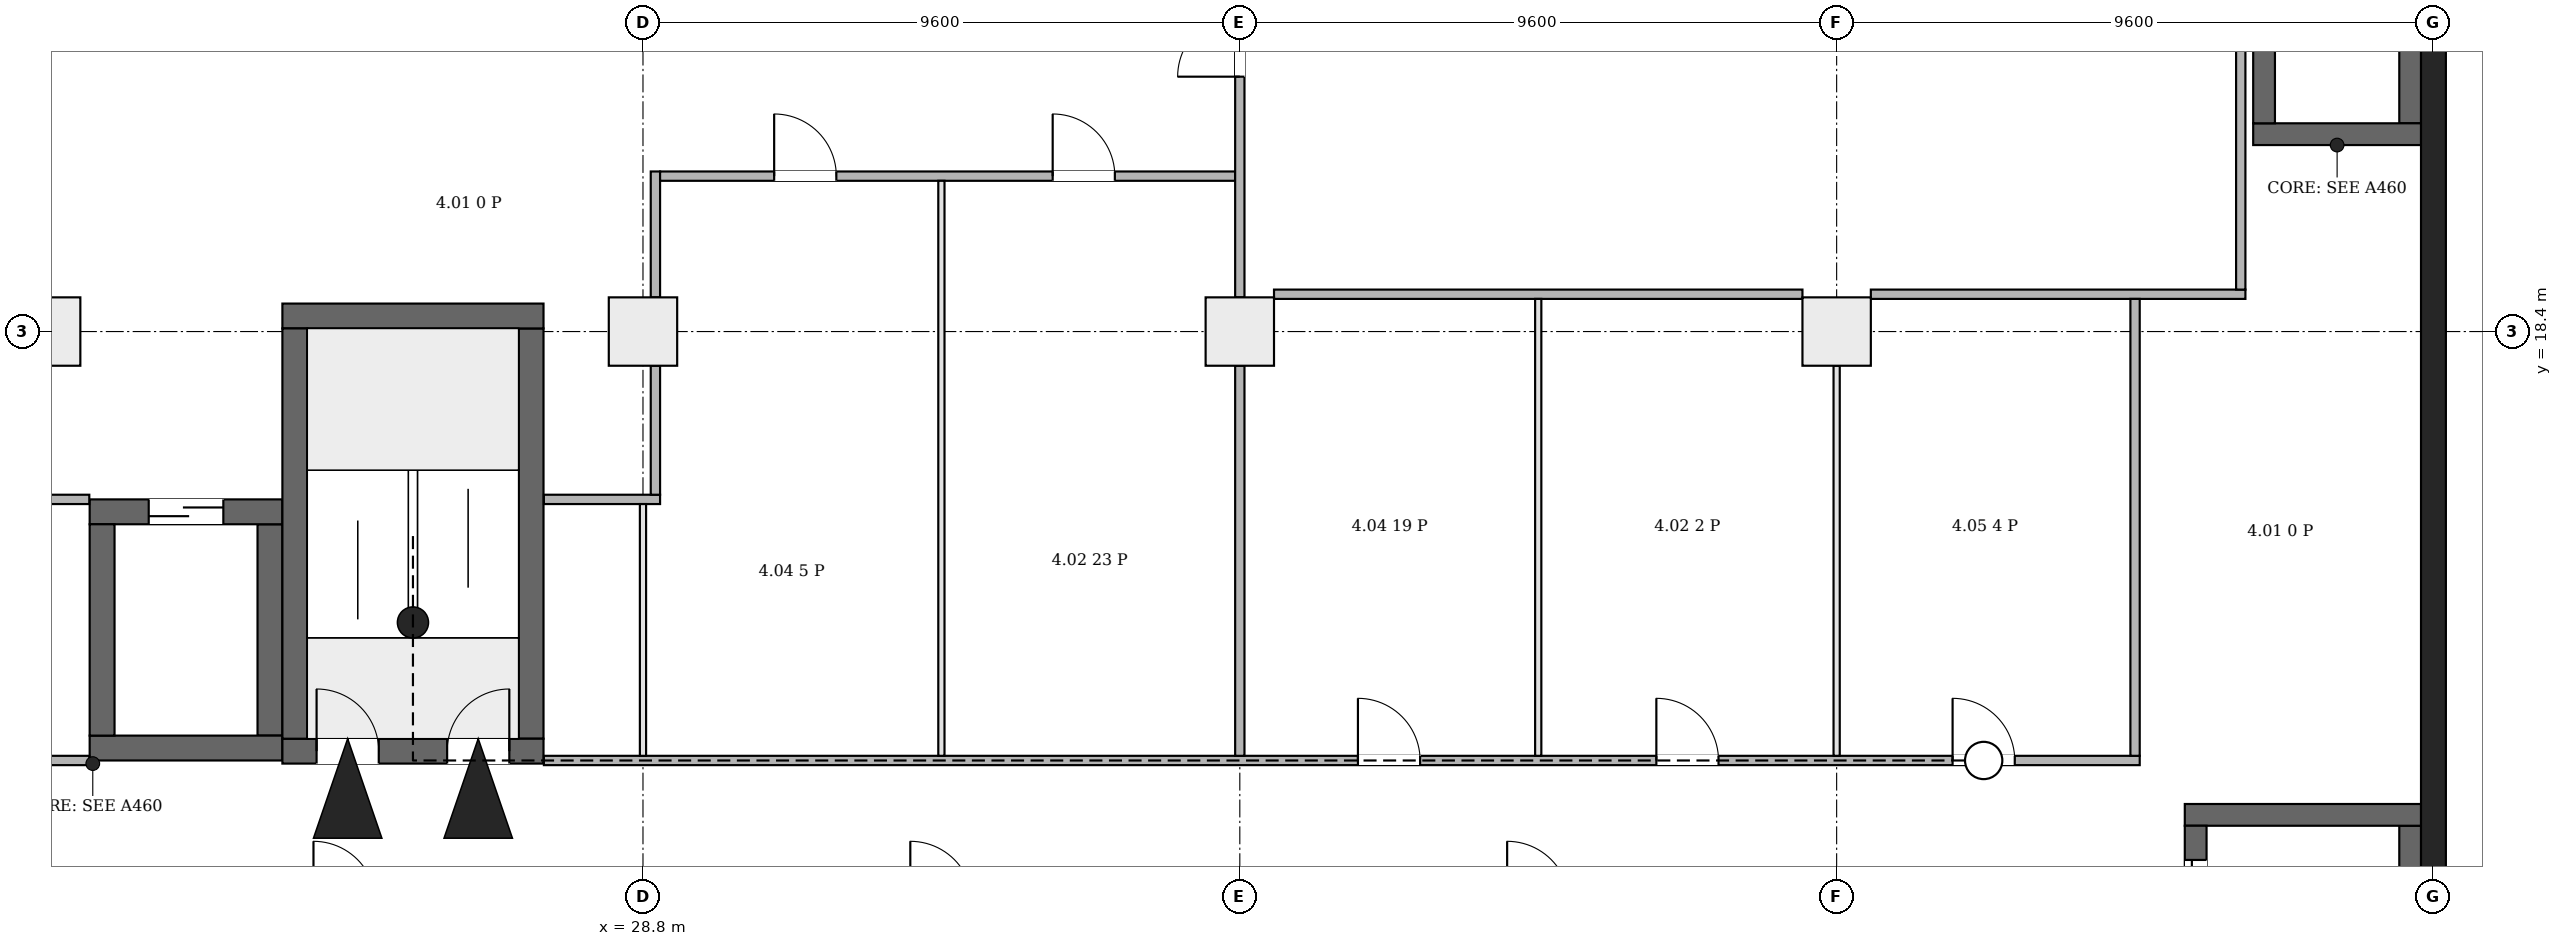
"""IFC4 building model, lengths in metres.
Left out: names, types, materials, properties, quantities, classifications, styles, units other than length and angle.
Written with IfcOpenShell. Run it as: python <this file> out.ifc"""

import sys

from ifc_helpers import new_model, si_unit, direction, frame, frame_2d, origin, origin_2d, place, context, subcontext, project, spatial, rectangle, extrude, element, fill, save


model = new_model("IFC4")
c1 = context("Model", 3, precision=1e-05, world=origin(), true_north=direction((0.0, 1.0)))
c2 = subcontext(c1, "Body", "Model", "MODEL_VIEW")
j1 = project(units=[si_unit("LENGTHUNIT", "METRE"), si_unit("PLANEANGLEUNIT", "RADIAN")], contexts=[c1])
p1 = place(None, origin())
s1 = spatial("IfcSite", under=j1, at=p1, CompositionType="ELEMENT")
p2 = place(p1, origin())
s2 = spatial("IfcBuilding", under=s1, at=p2, CompositionType="ELEMENT")
p3 = place(p2, frame((0.0, 0.0, 26.7)))
s3 = spatial("IfcBuildingStorey", under=s2, at=p3, CompositionType="ELEMENT", Elevation=26.7)
p4 = place(p3, frame((57.6, -0.2, 0.0), z_axis=(0.0, 0.0, 1.0), x_axis=(0.0, 1.0, 0.0)))
e1 = element("IfcWall", 1, at=p4, inside=s3, PredefinedType="SHEAR", context=c2, shape_type="SweptSolid", body=[
    extrude(rectangle(XDim=46.88, YDim=0.4, at=frame_2d((23.44, 0.0))), origin(), (0.0, 0.0, 1.0), 5.2),
])
p5 = place(p3, frame((23.0, 11.65, 0.0), z_axis=(0.0, 0.0, 1.0), x_axis=(1.0, 0.0, 0.0)))
e2 = element("IfcWall", 2, at=p5, inside=s3, PredefinedType="SHEAR", context=c2, shape_type="SweptSolid", body=[
    extrude(rectangle(XDim=4.2, YDim=0.4, at=frame_2d((2.1, 0.0))), origin(), (0.0, 0.0, 1.0), 5.2),
])
p6 = place(p5, frame((0.55, 0.0, 0.0)))
e3 = element("IfcOpeningElement", 3, at=p6, cuts=e2, PredefinedType="OPENING", context=c2, shape_type="SweptSolid", body=[
    extrude(rectangle(XDim=1.0, YDim=2.1, at=frame_2d((0.5, 1.05))), frame((0.0, 0.21, 0.0), z_axis=(0.0, -1.0, 0.0), x_axis=(1.0, 0.0, 0.0)), (0.0, 0.0, 1.0), 0.42),
])
p7 = place(p5, frame((2.65, 0.0, 0.0)))
e4 = element("IfcOpeningElement", 4, at=p7, cuts=e2, PredefinedType="OPENING", context=c2, shape_type="SweptSolid", body=[
    extrude(rectangle(XDim=1.0, YDim=2.1, at=frame_2d((0.5, 1.05))), frame((0.0, 0.21, 0.0), z_axis=(0.0, -1.0, 0.0), x_axis=(1.0, 0.0, 0.0)), (0.0, 0.0, 1.0), 0.42),
])
p8 = place(p3, frame((23.0, 18.65, 0.0), z_axis=(0.0, 0.0, 1.0), x_axis=(1.0, 0.0, 0.0)))
e5 = element("IfcWall", 5, at=p8, inside=s3, PredefinedType="SHEAR", context=c2, shape_type="SweptSolid", body=[
    extrude(rectangle(XDim=4.2, YDim=0.4, at=frame_2d((2.1, 0.0))), origin(), (0.0, 0.0, 1.0), 5.2),
])
for number, where, z_axis, x_axis in (
    (6, (23.2, 11.85, 0.0), (0.0, 0.0, 1.0), (0.0, 1.0, 0.0)),
    (7, (27.0, 11.85, 0.0), (0.0, 0.0, 1.0), (0.0, 1.0, 0.0)),
):
    element("IfcWall", number, at=place(p3, frame(where, z_axis=z_axis, x_axis=x_axis)), inside=s3, PredefinedType="SHEAR", context=c2, shape_type="SweptSolid", body=[
        extrude(rectangle(XDim=6.6, YDim=0.4, at=frame_2d((3.3, 0.0))), origin(), (0.0, 0.0, 1.0), 5.2),
    ])
p9 = place(p3, frame((53.6, 10.625, 0.0), z_axis=(0.0, 0.0, 1.0), x_axis=(1.0, 0.0, 0.0)))
e8 = element("IfcWall", 8, at=p9, inside=s3, PredefinedType="SHEAR", context=c2, shape_type="SweptSolid", body=[
    extrude(rectangle(XDim=3.8, YDim=0.35, at=frame_2d((1.9, 0.0))), origin(), (0.0, 0.0, 1.0), 5.2),
])
p10 = place(p3, frame((53.775, 8.25, 0.0), z_axis=(0.0, 0.0, 1.0), x_axis=(0.0, 1.0, 0.0)))
e9 = element("IfcWall", 9, at=p10, inside=s3, PredefinedType="SHEAR", context=c2, shape_type="SweptSolid", body=[
    extrude(rectangle(XDim=2.2, YDim=0.35, at=frame_2d((1.1, 0.0))), origin(), (0.0, 0.0, 1.0), 5.2),
])
p11 = place(p10, frame((0.55, 0.0, 0.0)))
e10 = element("IfcOpeningElement", 10, at=p11, cuts=e9, PredefinedType="OPENING", context=c2, shape_type="SweptSolid", body=[
    extrude(rectangle(XDim=1.1, YDim=2.1, at=frame_2d((0.55, 1.05))), frame((0.0, 0.185, 0.0), z_axis=(0.0, -1.0, 0.0), x_axis=(1.0, 0.0, 0.0)), (0.0, 0.0, 1.0), 0.37),
])
p12 = place(p3, frame((57.225, 8.25, 0.0), z_axis=(0.0, 0.0, 1.0), x_axis=(0.0, 1.0, 0.0)))
e11 = element("IfcWall", 11, at=p12, inside=s3, PredefinedType="SHEAR", context=c2, shape_type="SweptSolid", body=[
    extrude(rectangle(XDim=2.2, YDim=0.35, at=frame_2d((1.1, 0.0))), origin(), (0.0, 0.0, 1.0), 5.2),
])
p13 = place(p3, frame((54.7, 21.575, 0.0), z_axis=(0.0, 0.0, 1.0), x_axis=(1.0, 0.0, 0.0)))
e12 = element("IfcWall", 12, at=p13, inside=s3, PredefinedType="SHEAR", context=c2, shape_type="SweptSolid", body=[
    extrude(rectangle(XDim=2.7, YDim=0.35, at=frame_2d((1.35, 0.0))), origin(), (0.0, 0.0, 1.0), 5.2),
])
for number, where, z_axis, x_axis in (
    (13, (54.875, 21.75, 0.0), (0.0, 0.0, 1.0), (0.0, 1.0, 0.0)),
    (14, (57.225, 21.75, 0.0), (0.0, 0.0, 1.0), (0.0, 1.0, 0.0)),
):
    element("IfcWall", number, at=place(p3, frame(where, z_axis=z_axis, x_axis=x_axis)), inside=s3, PredefinedType="SHEAR", context=c2, shape_type="SweptSolid", body=[
        extrude(rectangle(XDim=3.5, YDim=0.35, at=frame_2d((1.75, 0.0))), origin(), (0.0, 0.0, 1.0), 5.2),
    ])
p14 = place(p3, frame((19.9, 11.7, 0.0), z_axis=(0.0, 0.0, 1.0), x_axis=(1.0, 0.0, 0.0)))
e15 = element("IfcWall", 15, at=p14, inside=s3, PredefinedType="SHEAR", context=c2, shape_type="SweptSolid", body=[
    extrude(rectangle(XDim=3.1, YDim=0.4, at=frame_2d((1.55, 0.0))), origin(), (0.0, 0.0, 1.0), 5.2),
])
p15 = place(p3, frame((19.9, 15.5, 0.0), z_axis=(0.0, 0.0, 1.0), x_axis=(1.0, 0.0, 0.0)))
e16 = element("IfcWall", 16, at=p15, inside=s3, PredefinedType="SHEAR", context=c2, shape_type="SweptSolid", body=[
    extrude(rectangle(XDim=3.1, YDim=0.4, at=frame_2d((1.55, 0.0))), origin(), (0.0, 0.0, 1.0), 5.2),
])
p16 = place(p15, frame((0.95, 0.0, 0.0)))
e17 = element("IfcOpeningElement", 17, at=p16, cuts=e16, PredefinedType="OPENING", context=c2, shape_type="SweptSolid", body=[
    extrude(rectangle(XDim=1.2, YDim=2.1, at=frame_2d((0.6, 1.05))), frame((0.0, 0.21, 0.0), z_axis=(0.0, -1.0, 0.0), x_axis=(1.0, 0.0, 0.0)), (0.0, 0.0, 1.0), 0.42),
])
for number, where, z_axis, x_axis in (
    (18, (20.1, 11.9, 0.0), (0.0, 0.0, 1.0), (0.0, 1.0, 0.0)),
    (19, (22.8, 11.9, 0.0), (0.0, 0.0, 1.0), (0.0, 1.0, 0.0)),
):
    element("IfcWall", number, at=place(p3, frame(where, z_axis=z_axis, x_axis=x_axis)), inside=s3, PredefinedType="SHEAR", context=c2, shape_type="SweptSolid", body=[
        extrude(rectangle(XDim=3.4, YDim=0.4, at=frame_2d((1.7, 0.0))), origin(), (0.0, 0.0, 1.0), 5.2),
    ])
for number, where, z_axis, x_axis in (
    (20, (19.2, 18.4, 0.0), (0.0, 0.0, 1.0), (1.0, 0.0, 0.0)),
    (21, (28.8, 18.4, 0.0), (0.0, 0.0, 1.0), (1.0, 0.0, 0.0)),
    (22, (38.4, 18.4, 0.0), (0.0, 0.0, 1.0), (1.0, 0.0, 0.0)),
    (23, (48.0, 18.4, 0.0), (0.0, 0.0, 1.0), (1.0, 0.0, 0.0)),
):
    element("IfcColumn", number, at=place(p3, frame(where, z_axis=z_axis, x_axis=x_axis)), inside=s3, PredefinedType="COLUMN", context=c2, shape_type="SweptSolid", body=[
        extrude(rectangle(XDim=1.1, YDim=1.1, at=origin_2d()), origin(), (0.0, 0.0, 1.0), 5.2),
    ])
p17 = place(p3, frame((10.325, 11.5, 0.0), z_axis=(0.0, 0.0, 1.0), x_axis=(1.0, 0.0, 0.0)))
e24 = element("IfcWall", 24, at=p17, inside=s3, PredefinedType="PARTITIONING", context=c2, shape_type="SweptSolid", body=[
    extrude(rectangle(XDim=9.569, YDim=0.15, at=frame_2d((4.785, 0.0))), origin(), (0.0, 0.0, 1.0), 4.85),
])
p18 = place(p3, frame((16.206, 15.7, 0.0), z_axis=(0.0, 0.0, 1.0), x_axis=(1.0, 0.0, 0.0)))
e25 = element("IfcWall", 25, at=p18, inside=s3, PredefinedType="PARTITIONING", context=c2, shape_type="SweptSolid", body=[
    extrude(rectangle(XDim=3.688, YDim=0.15, at=frame_2d((1.844, 0.0))), origin(), (0.0, 0.0, 1.0), 4.85),
])
p19 = place(p3, frame((27.206, 11.5, 0.0), z_axis=(0.0, 0.0, 1.0), x_axis=(1.0, 0.0, 0.0)))
e26 = element("IfcWall", 26, at=p19, inside=s3, PredefinedType="PARTITIONING", context=c2, shape_type="SweptSolid", body=[
    extrude(rectangle(XDim=25.669, YDim=0.15, at=frame_2d((12.834, 0.0))), origin(), (0.0, 0.0, 1.0), 4.85),
])
p20 = place(p19, frame((13.094, 0.0, 0.0)))
e27 = element("IfcOpeningElement", 27, at=p20, cuts=e26, PredefinedType="OPENING", context=c2, shape_type="SweptSolid", body=[
    extrude(rectangle(XDim=1.0, YDim=2.1, at=frame_2d((0.5, 1.05))), frame((0.0, 0.085, 0.0), z_axis=(0.0, -1.0, 0.0), x_axis=(1.0, 0.0, 0.0)), (0.0, 0.0, 1.0), 0.17),
])
p21 = place(p19, frame((17.894, 0.0, 0.0)))
e28 = element("IfcOpeningElement", 28, at=p21, cuts=e26, PredefinedType="OPENING", context=c2, shape_type="SweptSolid", body=[
    extrude(rectangle(XDim=1.0, YDim=2.1, at=frame_2d((0.5, 1.05))), frame((0.0, 0.085, 0.0), z_axis=(0.0, -1.0, 0.0), x_axis=(1.0, 0.0, 0.0)), (0.0, 0.0, 1.0), 0.17),
])
p22 = place(p19, frame((22.659, 0.0, 0.0)))
e29 = element("IfcOpeningElement", 29, at=p22, cuts=e26, PredefinedType="OPENING", context=c2, shape_type="SweptSolid", body=[
    extrude(rectangle(XDim=1.0, YDim=2.1, at=frame_2d((0.5, 1.05))), frame((0.0, 0.085, 0.0), z_axis=(0.0, -1.0, 0.0), x_axis=(1.0, 0.0, 0.0)), (0.0, 0.0, 1.0), 0.17),
])
p23 = place(p3, frame((27.206, 15.7, 0.0), z_axis=(0.0, 0.0, 1.0), x_axis=(1.0, 0.0, 0.0)))
e30 = element("IfcWall", 30, at=p23, inside=s3, PredefinedType="PARTITIONING", context=c2, shape_type="SweptSolid", body=[
    extrude(rectangle(XDim=1.869, YDim=0.15, at=frame_2d((0.935, 0.0))), origin(), (0.0, 0.0, 1.0), 4.85),
])
p24 = place(p3, frame((28.8, 11.575, 0.0), z_axis=(0.0, 0.0, 1.0), x_axis=(0.0, 1.0, 0.0)))
e31 = element("IfcWall", 31, at=p24, inside=s3, PredefinedType="PARTITIONING", context=c2, shape_type="SweptSolid", body=[
    extrude(rectangle(XDim=4.05, YDim=0.1, at=frame_2d((2.025, 0.0))), origin(), (0.0, 0.0, 1.0), 4.45),
])
p25 = place(p3, frame((29.0, 15.775, 0.0), z_axis=(0.0, 0.0, 1.0), x_axis=(0.0, 1.0, 0.0)))
e32 = element("IfcWall", 32, at=p25, inside=s3, PredefinedType="PARTITIONING", context=c2, shape_type="SweptSolid", body=[
    extrude(rectangle(XDim=2.075, YDim=0.15, at=frame_2d((1.038, 0.0))), origin(), (0.0, 0.0, 1.0), 4.45),
])
p26 = place(p3, frame((29.0, 18.95, 0.0), z_axis=(0.0, 0.0, 1.0), x_axis=(0.0, 1.0, 0.0)))
e33 = element("IfcWall", 33, at=p26, inside=s3, PredefinedType="PARTITIONING", context=c2, shape_type="SweptSolid", body=[
    extrude(rectangle(XDim=2.025, YDim=0.15, at=frame_2d((1.013, 0.0))), origin(), (0.0, 0.0, 1.0), 4.45),
])
p27 = place(p3, frame((29.075, 20.9, 0.0), z_axis=(0.0, 0.0, 1.0), x_axis=(1.0, 0.0, 0.0)))
e34 = element("IfcWall", 34, at=p27, inside=s3, PredefinedType="PARTITIONING", context=c2, shape_type="SweptSolid", body=[
    extrude(rectangle(XDim=9.25, YDim=0.15, at=frame_2d((4.625, 0.0))), origin(), (0.0, 0.0, 1.0), 4.85),
])
p28 = place(p27, frame((1.835, 0.0, 0.0)))
e35 = element("IfcOpeningElement", 35, at=p28, cuts=e34, PredefinedType="OPENING", context=c2, shape_type="SweptSolid", body=[
    extrude(rectangle(XDim=1.0, YDim=2.1, at=frame_2d((0.5, 1.05))), frame((0.0, 0.085, 0.0), z_axis=(0.0, -1.0, 0.0), x_axis=(1.0, 0.0, 0.0)), (0.0, 0.0, 1.0), 0.17),
])
p29 = place(p27, frame((6.315, 0.0, 0.0)))
e36 = element("IfcOpeningElement", 36, at=p29, cuts=e34, PredefinedType="OPENING", context=c2, shape_type="SweptSolid", body=[
    extrude(rectangle(XDim=1.0, YDim=2.1, at=frame_2d((0.5, 1.05))), frame((0.0, 0.085, 0.0), z_axis=(0.0, -1.0, 0.0), x_axis=(1.0, 0.0, 0.0)), (0.0, 0.0, 1.0), 0.17),
])
p30 = place(p3, frame((33.6, 11.575, 0.0), z_axis=(0.0, 0.0, 1.0), x_axis=(0.0, 1.0, 0.0)))
e37 = element("IfcWall", 37, at=p30, inside=s3, PredefinedType="PARTITIONING", context=c2, shape_type="SweptSolid", body=[
    extrude(rectangle(XDim=9.25, YDim=0.1, at=frame_2d((4.625, 0.0))), origin(), (0.0, 0.0, 1.0), 4.85),
])
p31 = place(p3, frame((38.4, 11.575, 0.0), z_axis=(0.0, 0.0, 1.0), x_axis=(0.0, 1.0, 0.0)))
e38 = element("IfcWall", 38, at=p31, inside=s3, PredefinedType="PARTITIONING", context=c2, shape_type="SweptSolid", body=[
    extrude(rectangle(XDim=6.275, YDim=0.15, at=frame_2d((3.138, 0.0))), origin(), (0.0, 0.0, 1.0), 4.45),
])
p32 = place(p3, frame((38.4, 18.95, 0.0), z_axis=(0.0, 0.0, 1.0), x_axis=(0.0, 1.0, 0.0)))
e39 = element("IfcWall", 39, at=p32, inside=s3, PredefinedType="PARTITIONING", context=c2, shape_type="SweptSolid", body=[
    extrude(rectangle(XDim=8.1, YDim=0.15, at=frame_2d((4.05, 0.0))), origin(), (0.0, 0.0, 1.0), 4.45),
])
p33 = place(p32, frame((3.55, 0.0, 0.0)))
e40 = element("IfcOpeningElement", 40, at=p33, cuts=e39, PredefinedType="OPENING", context=c2, shape_type="SweptSolid", body=[
    extrude(rectangle(XDim=1.0, YDim=2.1, at=frame_2d((0.5, 1.05))), frame((0.0, 0.085, 0.0), z_axis=(0.0, -1.0, 0.0), x_axis=(1.0, 0.0, 0.0)), (0.0, 0.0, 1.0), 0.17),
])
p34 = place(p3, frame((38.95, 19.0, 0.0), z_axis=(0.0, 0.0, 1.0), x_axis=(1.0, 0.0, 0.0)))
e41 = element("IfcWall", 41, at=p34, inside=s3, PredefinedType="PARTITIONING", context=c2, shape_type="SweptSolid", body=[
    extrude(rectangle(XDim=8.5, YDim=0.15, at=frame_2d((4.25, 0.0))), origin(), (0.0, 0.0, 1.0), 4.85),
])
p35 = place(p3, frame((43.2, 11.575, 0.0), z_axis=(0.0, 0.0, 1.0), x_axis=(0.0, 1.0, 0.0)))
e42 = element("IfcWall", 42, at=p35, inside=s3, PredefinedType="PARTITIONING", context=c2, shape_type="SweptSolid", body=[
    extrude(rectangle(XDim=7.35, YDim=0.1, at=frame_2d((3.675, 0.0))), origin(), (0.0, 0.0, 1.0), 4.85),
])
p36 = place(p3, frame((48.0, 11.575, 0.0), z_axis=(0.0, 0.0, 1.0), x_axis=(0.0, 1.0, 0.0)))
e43 = element("IfcWall", 43, at=p36, inside=s3, PredefinedType="PARTITIONING", context=c2, shape_type="SweptSolid", body=[
    extrude(rectangle(XDim=6.275, YDim=0.1, at=frame_2d((3.138, 0.0))), origin(), (0.0, 0.0, 1.0), 4.85),
])
p37 = place(p3, frame((48.55, 19.0, 0.0), z_axis=(0.0, 0.0, 1.0), x_axis=(1.0, 0.0, 0.0)))
e44 = element("IfcWall", 44, at=p37, inside=s3, PredefinedType="PARTITIONING", context=c2, shape_type="SweptSolid", body=[
    extrude(rectangle(XDim=6.025, YDim=0.15, at=frame_2d((3.012, 0.0))), origin(), (0.0, 0.0, 1.0), 4.85),
])
p38 = place(p3, frame((52.8, 11.575, 0.0), z_axis=(0.0, 0.0, 1.0), x_axis=(0.0, 1.0, 0.0)))
e45 = element("IfcWall", 45, at=p38, inside=s3, PredefinedType="PARTITIONING", context=c2, shape_type="SweptSolid", body=[
    extrude(rectangle(XDim=7.35, YDim=0.15, at=frame_2d((3.675, 0.0))), origin(), (0.0, 0.0, 1.0), 4.85),
])
p39 = place(p3, frame((54.5, 19.075, 0.0), z_axis=(0.0, 0.0, 1.0), x_axis=(0.0, 1.0, 0.0)))
e46 = element("IfcWall", 46, at=p39, inside=s3, PredefinedType="PARTITIONING", context=c2, shape_type="SweptSolid", body=[
    extrude(rectangle(XDim=8.0, YDim=0.15, at=frame_2d((4.0, 0.0))), origin(), (0.0, 0.0, 1.0), 4.85),
])
p40 = place(p6, origin())
e47 = element("IfcDoor", 47, at=p40, inside=s3, OperationType="SINGLE_SWING_RIGHT", PredefinedType="DOOR", context=c2, shape_type="SweptSolid", body=[
    extrude(rectangle(XDim=1.0, YDim=2.1, at=frame_2d((0.5, 1.05))), frame((0.0, 0.025, 0.0), z_axis=(0.0, -1.0, 0.0), x_axis=(1.0, 0.0, 0.0)), (0.0, 0.0, 1.0), 0.05),
])
fill(e3, e47)
p41 = place(p7, origin())
e48 = element("IfcDoor", 48, at=p41, inside=s3, OperationType="SINGLE_SWING_LEFT", PredefinedType="DOOR", context=c2, shape_type="SweptSolid", body=[
    extrude(rectangle(XDim=1.0, YDim=2.1, at=frame_2d((0.5, 1.05))), frame((0.0, 0.025, 0.0), z_axis=(0.0, -1.0, 0.0), x_axis=(1.0, 0.0, 0.0)), (0.0, 0.0, 1.0), 0.05),
])
fill(e4, e48)
p42 = place(p11, origin())
e49 = element("IfcDoor", 49, at=p42, inside=s3, OperationType="DOUBLE_DOOR_SLIDING", PredefinedType="DOOR", context=c2, shape_type="SweptSolid", body=[
    extrude(rectangle(XDim=1.1, YDim=2.1, at=frame_2d((0.55, 1.05))), frame((0.0, 0.025, 0.0), z_axis=(0.0, -1.0, 0.0), x_axis=(1.0, 0.0, 0.0)), (0.0, 0.0, 1.0), 0.05),
])
fill(e10, e49)
p43 = place(p16, origin())
e50 = element("IfcDoor", 50, at=p43, inside=s3, OperationType="DOUBLE_DOOR_SLIDING", PredefinedType="DOOR", context=c2, shape_type="SweptSolid", body=[
    extrude(rectangle(XDim=1.2, YDim=2.1, at=frame_2d((0.6, 1.05))), frame((0.0, 0.025, 0.0), z_axis=(0.0, -1.0, 0.0), x_axis=(1.0, 0.0, 0.0)), (0.0, 0.0, 1.0), 0.05),
])
fill(e17, e50)
p44 = place(p28, origin())
e51 = element("IfcDoor", 51, at=p44, inside=s3, OperationType="SINGLE_SWING_RIGHT", PredefinedType="DOOR", context=c2, shape_type="SweptSolid", body=[
    extrude(rectangle(XDim=1.0, YDim=2.1, at=frame_2d((0.5, 1.05))), frame((0.0, 0.025, 0.0), z_axis=(0.0, -1.0, 0.0), x_axis=(1.0, 0.0, 0.0)), (0.0, 0.0, 1.0), 0.05),
])
fill(e35, e51)
p45 = place(p29, origin())
e52 = element("IfcDoor", 52, at=p45, inside=s3, OperationType="SINGLE_SWING_LEFT", PredefinedType="DOOR", context=c2, shape_type="SweptSolid", body=[
    extrude(rectangle(XDim=1.0, YDim=2.1, at=frame_2d((0.5, 1.05))), frame((0.0, 0.025, 0.0), z_axis=(0.0, -1.0, 0.0), x_axis=(1.0, 0.0, 0.0)), (0.0, 0.0, 1.0), 0.05),
])
fill(e36, e52)
p46 = place(p20, origin())
e53 = element("IfcDoor", 53, at=p46, inside=s3, OperationType="SINGLE_SWING_RIGHT", PredefinedType="DOOR", context=c2, shape_type="SweptSolid", body=[
    extrude(rectangle(XDim=1.0, YDim=2.1, at=frame_2d((0.5, 1.05))), frame((0.0, 0.025, 0.0), z_axis=(0.0, -1.0, 0.0), x_axis=(1.0, 0.0, 0.0)), (0.0, 0.0, 1.0), 0.05),
])
fill(e27, e53)
p47 = place(p21, origin())
e54 = element("IfcDoor", 54, at=p47, inside=s3, OperationType="SINGLE_SWING_RIGHT", PredefinedType="DOOR", context=c2, shape_type="SweptSolid", body=[
    extrude(rectangle(XDim=1.0, YDim=2.1, at=frame_2d((0.5, 1.05))), frame((0.0, 0.025, 0.0), z_axis=(0.0, -1.0, 0.0), x_axis=(1.0, 0.0, 0.0)), (0.0, 0.0, 1.0), 0.05),
])
fill(e28, e54)
p48 = place(p22, origin())
e55 = element("IfcDoor", 55, at=p48, inside=s3, OperationType="SINGLE_SWING_RIGHT", PredefinedType="DOOR", context=c2, shape_type="SweptSolid", body=[
    extrude(rectangle(XDim=1.0, YDim=2.1, at=frame_2d((0.5, 1.05))), frame((0.0, 0.025, 0.0), z_axis=(0.0, -1.0, 0.0), x_axis=(1.0, 0.0, 0.0)), (0.0, 0.0, 1.0), 0.05),
])
fill(e29, e55)
p49 = place(p33, origin())
e56 = element("IfcDoor", 56, at=p49, inside=s3, OperationType="SINGLE_SWING_RIGHT", PredefinedType="DOOR", context=c2, shape_type="SweptSolid", body=[
    extrude(rectangle(XDim=1.0, YDim=2.1, at=frame_2d((0.5, 1.05))), frame((0.0, 0.025, 0.0), z_axis=(0.0, -1.0, 0.0), x_axis=(1.0, 0.0, 0.0)), (0.0, 0.0, 1.0), 0.05),
])
fill(e40, e56)
save(model, sys.argv[1])
